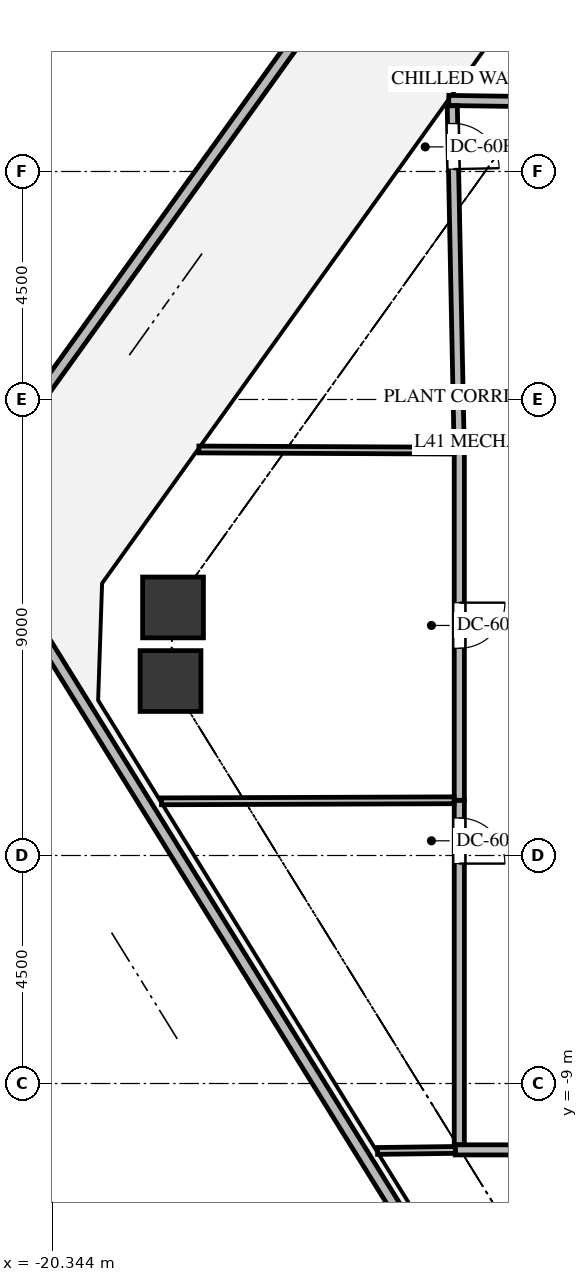
"""IFC4 building model, lengths in metres.
Left out: names, types, materials, properties, quantities, classifications, styles, units other than length and angle.
Written with IfcOpenShell. Run it as: python <this file> out.ifc"""

import sys

from ifc_helpers import new_model, si_unit, direction, frame, frame_2d, origin, origin_2d, place, context, subcontext, project, spatial, rectangle, extrude, source, transform, mapped, element, fill, save


model = new_model("IFC4")
c1 = context("Model", 3, precision=1e-05, world=origin(), true_north=direction((0.0, 1.0)))
c2 = subcontext(c1, "Body", "Model", "MODEL_VIEW")
j1 = project(units=[si_unit("LENGTHUNIT", "METRE"), si_unit("PLANEANGLEUNIT", "RADIAN")], contexts=[c1])
p1 = place(None, origin())
s1 = spatial("IfcSite", under=j1, at=p1, CompositionType="ELEMENT")
p2 = place(p1, origin())
s2 = spatial("IfcBuilding", under=s1, at=p2, CompositionType="ELEMENT")
p3 = place(p2, frame((0.0, 0.0, 150.3)))
s3 = spatial("IfcBuildingStorey", under=s2, at=p3, CompositionType="ELEMENT", Elevation=150.3)
m1 = source(origin(), c2, "Body", "SweptSolid", [
    extrude(rectangle(XDim=1.2, YDim=1.2, at=origin_2d()), origin(), (0.0, 0.0, 1.0), 4.8),
])
for number, where, z_axis, x_axis in (
    (1, (-18.009, -1.057, -0.32), (0.0, 0.0, 1.0), (1.0, 0.0, 0.0)),
    (2, (-17.96, 0.396, -0.32), (0.0, 0.0, 1.0), (1.0, 0.0, 0.0)),
):
    element("IfcColumn", number, at=place(p3, frame(where, z_axis=z_axis, x_axis=x_axis)), inside=s3, PredefinedType="COLUMN", context=c2, shape_type="MappedRepresentation", body=[
        mapped(m1, transform((0.0, 0.0, 0.0), x_axis=(1.0, 0.0, 0.0), y_axis=(0.0, 1.0, 0.0), z_axis=(0.0, 0.0, 1.0), scale=1.0)),
    ])
p4 = place(p3, frame((-10.934, -15.688, 0.0), z_axis=(0.0, 0.0, 1.0), x_axis=(-0.527101579679, 0.849802285652, 0.0)))
e3 = element("IfcWall", 3, at=p4, inside=s3, PredefinedType="PARAPET", context=c2, shape_type="SweptSolid", body=[
    extrude(rectangle(XDim=19.866, YDim=0.22, at=frame_2d((9.933, 0.0))), origin(), (0.0, 0.0, 1.0), 1.2),
])
p5 = place(p3, frame((-21.326, 3.526, 0.0), z_axis=(0.0, 0.0, 1.0), x_axis=(0.583446750611, 0.812151395493, 0.0)))
e4 = element("IfcWall", 4, at=p5, inside=s3, PredefinedType="PARAPET", context=c2, shape_type="SweptSolid", body=[
    extrude(rectangle(XDim=19.587, YDim=0.22, at=frame_2d((9.794, 0.0))), origin(), (0.0, 0.0, 1.0), 1.2),
])
p6 = place(p3, frame((-6.06, 10.31, 0.0), z_axis=(0.0, 0.0, 1.0), x_axis=(-0.999899519245, 0.014175733232, 0.0)))
e5 = element("IfcWall", 5, at=p6, inside=s3, PredefinedType="SOLIDWALL", context=c2, shape_type="SweptSolid", body=[
    extrude(rectangle(XDim=6.458, YDim=0.2, at=frame_2d((3.229, 0.0))), origin(), (0.0, 0.0, 1.0), 3.662),
])
p7 = place(p6, frame((0.35, 0.0, 0.0)))
e6 = element("IfcOpeningElement", 6, at=p7, cuts=e5, PredefinedType="OPENING", context=c2, shape_type="SweptSolid", body=[
    extrude(rectangle(XDim=0.9, YDim=2.05, at=frame_2d((0.45, 1.025))), frame((0.0, 0.11, 0.0), z_axis=(0.0, -1.0, 0.0), x_axis=(1.0, 0.0, 0.0)), (0.0, 0.0, 1.0), 0.22),
])
p8 = place(p3, frame((-12.39, -10.31, 0.0), z_axis=(0.0, 0.0, 1.0), x_axis=(1.0, 0.0, 0.0)))
e7 = element("IfcWall", 7, at=p8, inside=s3, PredefinedType="SOLIDWALL", context=c2, shape_type="SweptSolid", body=[
    extrude(rectangle(XDim=6.33, YDim=0.2, at=frame_2d((3.165, 0.0))), origin(), (0.0, 0.0, 1.0), 3.819),
])
p9 = place(p8, frame((3.53, 0.0, 0.0)))
e8 = element("IfcOpeningElement", 8, at=p9, cuts=e7, PredefinedType="OPENING", context=c2, shape_type="SweptSolid", body=[
    extrude(rectangle(XDim=1.4, YDim=2.15, at=frame_2d((0.7, 1.075))), frame((0.0, 0.11, 0.0), z_axis=(0.0, -1.0, 0.0), x_axis=(1.0, 0.0, 0.0)), (0.0, 0.0, 1.0), 0.22),
])
p10 = place(p3, frame((-12.31, -3.41, 0.0), z_axis=(0.0, 0.0, 1.0), x_axis=(0.0, -1.0, 0.0)))
e9 = element("IfcWall", 9, at=p10, inside=s3, PredefinedType="SOLIDWALL", context=c2, shape_type="SweptSolid", body=[
    extrude(rectangle(XDim=6.796, YDim=0.2, at=frame_2d((3.398, 0.0))), origin(), (0.0, 0.0, 1.0), 3.819),
])
p11 = place(p10, frame((0.35, 0.0, 0.0)))
e10 = element("IfcOpeningElement", 10, at=p11, cuts=e9, PredefinedType="OPENING", context=c2, shape_type="SweptSolid", body=[
    extrude(rectangle(XDim=0.9, YDim=2.05, at=frame_2d((0.45, 1.025))), frame((0.0, 0.11, 0.0), z_axis=(0.0, -1.0, 0.0), x_axis=(1.0, 0.0, 0.0)), (0.0, 0.0, 1.0), 0.22),
])
p12 = place(p3, frame((-12.31, 3.49, 0.0), z_axis=(0.0, 0.0, 1.0), x_axis=(0.0, -1.0, 0.0)))
e11 = element("IfcWall", 11, at=p12, inside=s3, PredefinedType="SOLIDWALL", context=c2, shape_type="SweptSolid", body=[
    extrude(rectangle(XDim=6.9, YDim=0.2, at=frame_2d((3.45, 0.0))), origin(), (0.0, 0.0, 1.0), 3.662),
])
p13 = place(p12, frame((3.0, 0.0, 0.0)))
e12 = element("IfcOpeningElement", 12, at=p13, cuts=e11, PredefinedType="OPENING", context=c2, shape_type="SweptSolid", body=[
    extrude(rectangle(XDim=0.9, YDim=2.05, at=frame_2d((0.45, 1.025))), frame((0.0, 0.11, 0.0), z_axis=(0.0, -1.0, 0.0), x_axis=(1.0, 0.0, 0.0)), (0.0, 0.0, 1.0), 0.22),
])
p14 = place(p3, frame((-12.449, 10.296, 0.0), z_axis=(0.0, 0.0, 1.0), x_axis=(0.020190295039, -0.999796155217, 0.0)))
e13 = element("IfcWall", 13, at=p14, inside=s3, PredefinedType="SOLIDWALL", context=c2, shape_type="SweptSolid", body=[
    extrude(rectangle(XDim=6.808, YDim=0.2, at=frame_2d((3.404, 0.0))), origin(), (0.0, 0.0, 1.0), 3.819),
])
p15 = place(p14, frame((0.35, 0.0, 0.0)))
e14 = element("IfcOpeningElement", 14, at=p15, cuts=e13, PredefinedType="OPENING", context=c2, shape_type="SweptSolid", body=[
    extrude(rectangle(XDim=0.9, YDim=2.05, at=frame_2d((0.45, 1.025))), frame((0.0, 0.11, 0.0), z_axis=(0.0, -1.0, 0.0), x_axis=(1.0, 0.0, 0.0)), (0.0, 0.0, 1.0), 0.22),
])
p16 = place(p3, frame((-13.924, -10.331, 0.0), z_axis=(0.0, 0.0, 1.0), x_axis=(0.999914818291, 0.01305205589, 0.0)))
e15 = element("IfcWall", 15, at=p16, inside=s3, PredefinedType="PARTITIONING", context=c2, shape_type="SweptSolid", body=[
    extrude(rectangle(XDim=1.534, YDim=0.135, at=frame_2d((0.767, 0.0))), origin(), (0.0, 0.0, 1.0), 3.819),
])
p17 = place(p3, frame((-18.188, -3.431, 0.0), z_axis=(0.0, 0.0, 1.0), x_axis=(0.999993540263, 0.003594361084, 0.0)))
e16 = element("IfcWall", 16, at=p17, inside=s3, PredefinedType="PARTITIONING", context=c2, shape_type="SweptSolid", body=[
    extrude(rectangle(XDim=5.773, YDim=0.135, at=frame_2d((2.887, 0.0))), origin(), (0.0, 0.0, 1.0), 3.819),
])
p18 = place(p3, frame((-17.45, 3.513, 0.0), z_axis=(0.0, 0.0, 1.0), x_axis=(0.999989829274, -0.004510138415, 0.0)))
e17 = element("IfcWall", 17, at=p18, inside=s3, PredefinedType="PARTITIONING", context=c2, shape_type="SweptSolid", body=[
    extrude(rectangle(XDim=5.034, YDim=0.135, at=frame_2d((2.517, 0.0))), origin(), (0.0, 0.0, 1.0), 3.819),
])
m2 = source(origin(), c2, "Body", "SweptSolid", [
    extrude(rectangle(XDim=0.9, YDim=2.05, at=frame_2d((0.45, 1.025))), frame((0.0, 0.025, 0.0), z_axis=(0.0, -1.0, 0.0), x_axis=(1.0, 0.0, 0.0)), (0.0, 0.0, 1.0), 0.05),
])
p19 = place(p11, origin())
e18 = element("IfcDoor", 18, at=p19, inside=s3, OperationType="SINGLE_SWING_RIGHT", PredefinedType="DOOR", context=c2, shape_type="MappedRepresentation", body=[
    mapped(m2, transform((0.0, 0.0, 0.0), x_axis=(1.0, 0.0, 0.0), y_axis=(0.0, 1.0, 0.0), z_axis=(0.0, 0.0, 1.0), scale=1.0)),
])
fill(e10, e18)
m3 = source(origin(), c2, "Body", "SweptSolid", [
    extrude(rectangle(XDim=0.9, YDim=2.05, at=frame_2d((0.45, 1.025))), frame((0.0, 0.025, 0.0), z_axis=(0.0, -1.0, 0.0), x_axis=(1.0, 0.0, 0.0)), (0.0, 0.0, 1.0), 0.05),
])
p20 = place(p13, origin())
e19 = element("IfcDoor", 19, at=p20, inside=s3, OperationType="SINGLE_SWING_LEFT", PredefinedType="DOOR", context=c2, shape_type="MappedRepresentation", body=[
    mapped(m3, transform((0.0, 0.0, 0.0), x_axis=(1.0, 0.0, 0.0), y_axis=(0.0, 1.0, 0.0), z_axis=(0.0, 0.0, 1.0), scale=1.0)),
])
fill(e12, e19)
p21 = place(p15, origin())
e20 = element("IfcDoor", 20, at=p21, inside=s3, OperationType="SINGLE_SWING_RIGHT", PredefinedType="DOOR", context=c2, shape_type="MappedRepresentation", body=[
    mapped(m2, transform((0.0, 0.0, 0.0), x_axis=(1.0, 0.0, 0.0), y_axis=(0.0, 1.0, 0.0), z_axis=(0.0, 0.0, 1.0), scale=1.0)),
])
fill(e14, e20)
save(model, sys.argv[1])
